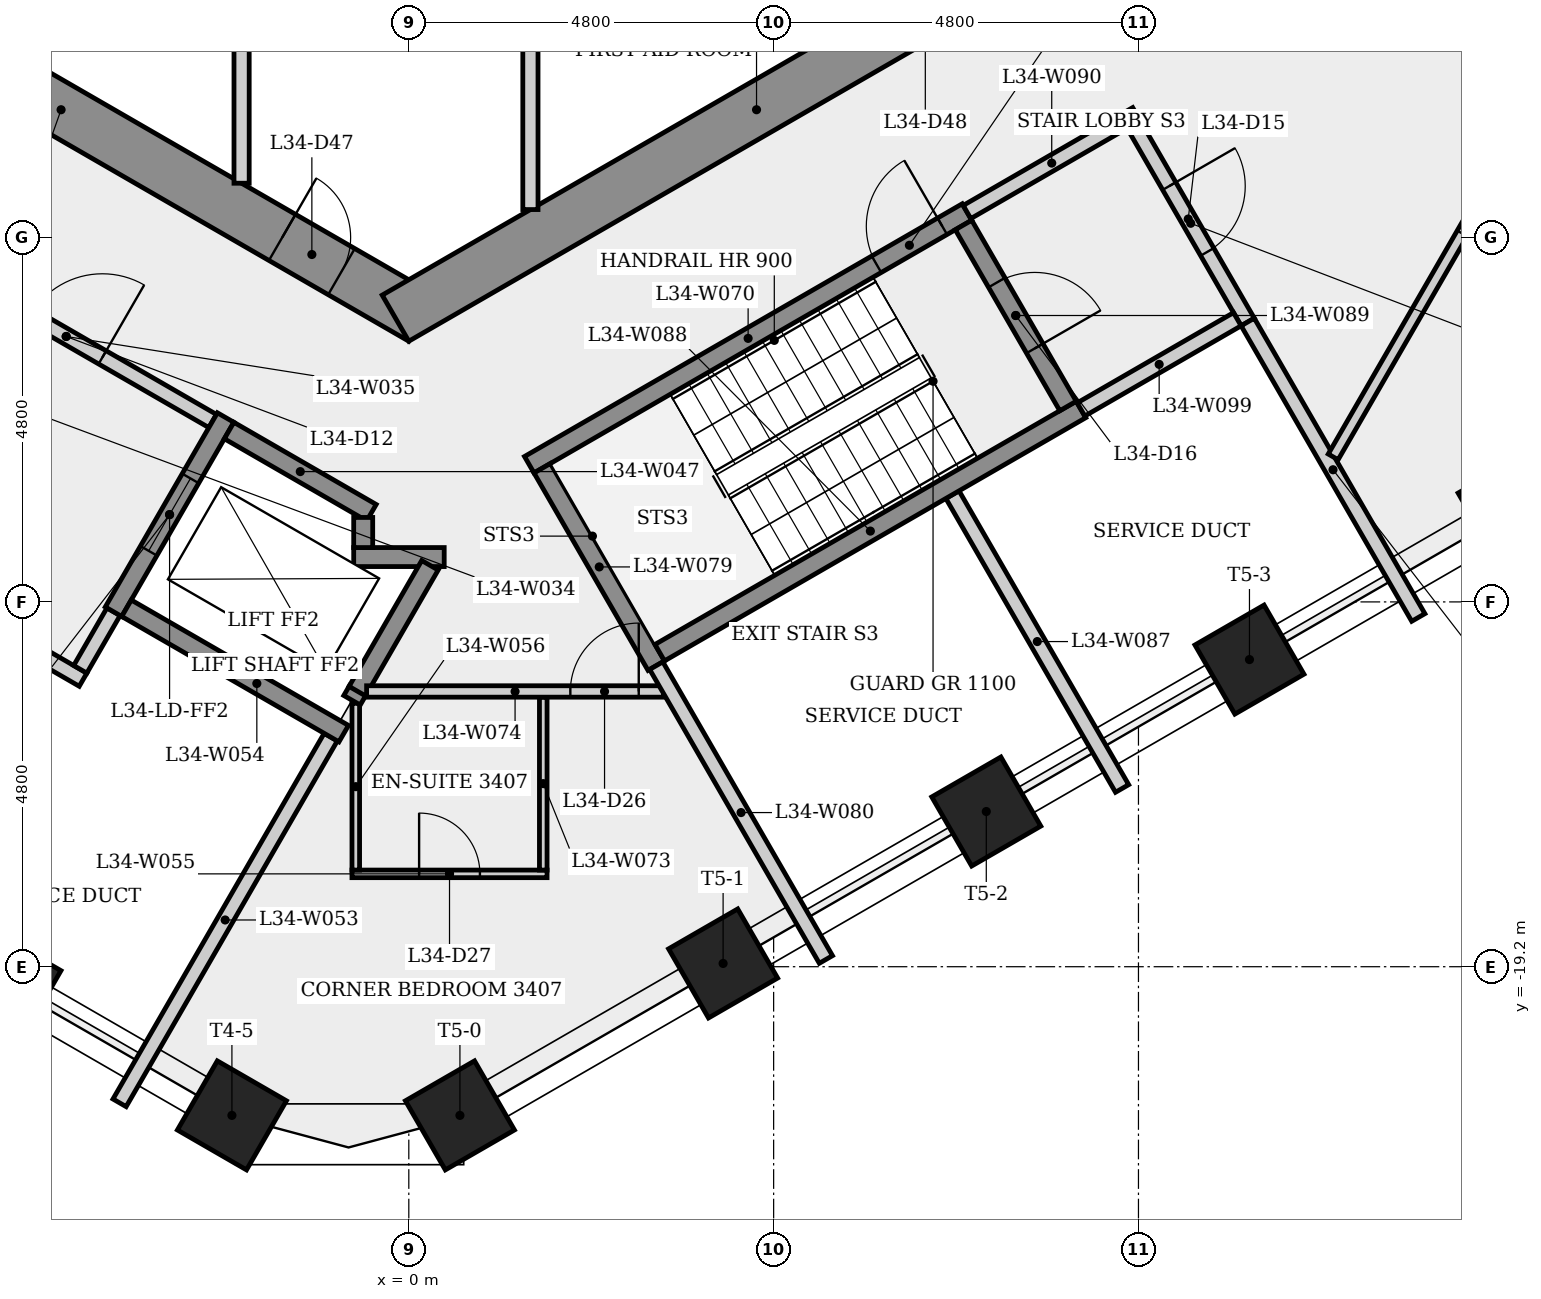
"""IFC4 building model, lengths in metres.
Left out: names, types, materials, properties, quantities, classifications, styles, units other than length and angle.
Written with IfcOpenShell. Run it as: python <this file> out.ifc"""

import sys

from ifc_helpers import new_model, si_unit, direction, frame, frame_2d, origin, origin_2d, place, context, subcontext, project, spatial, rectangle, extrude, element, fill, save


model = new_model("IFC4")
c1 = context("Model", 3, precision=1e-05, world=origin(), true_north=direction((0.0, 1.0)))
c2 = subcontext(c1, "Body", "Model", "MODEL_VIEW")
j1 = project(units=[si_unit("LENGTHUNIT", "METRE"), si_unit("PLANEANGLEUNIT", "RADIAN")], contexts=[c1])
p1 = place(None, origin())
s1 = spatial("IfcSite", under=j1, at=p1, CompositionType="ELEMENT")
p2 = place(p1, origin())
s2 = spatial("IfcBuilding", under=s1, at=p2, CompositionType="ELEMENT")
p3 = place(p2, frame((0.0, 0.0, 128.5)))
s3 = spatial("IfcBuildingStorey", under=s2, at=p3, CompositionType="ELEMENT", Elevation=128.5)
p4 = place(p3, frame((-9.325, -5.182, 0.0), z_axis=(0.0, 0.0, 1.0), x_axis=(0.866023993627, -0.500002442456, 0.0)))
e1 = element("IfcWall", 1, at=p4, inside=s3, PredefinedType="SHEAR", context=c2, shape_type="SweptSolid", body=[
    extrude(rectangle(XDim=10.97, YDim=0.7, at=frame_2d((5.485, 0.0))), origin(), (0.0, 0.0, 1.0), 4.0),
])
p5 = place(p4, frame((2.125, 0.0, 0.0)))
e2 = element("IfcOpeningElement", 2, at=p5, cuts=e1, PredefinedType="OPENING", context=c2, shape_type="SweptSolid", body=[
    extrude(rectangle(XDim=0.9, YDim=2.1, at=frame_2d((0.45, 1.05))), frame((0.0, 0.36, 0.0), z_axis=(0.0, -1.0, 0.0), x_axis=(1.0, 0.0, 0.0)), (0.0, 0.0, 1.0), 0.72),
])
p6 = place(p4, frame((8.845, 0.0, 0.0)))
e3 = element("IfcOpeningElement", 3, at=p6, cuts=e1, PredefinedType="OPENING", context=c2, shape_type="SweptSolid", body=[
    extrude(rectangle(XDim=0.9, YDim=2.1, at=frame_2d((0.45, 1.05))), frame((0.0, 0.36, 0.0), z_axis=(0.0, -1.0, 0.0), x_axis=(1.0, 0.0, 0.0)), (0.0, 0.0, 1.0), 0.72),
])
p7 = place(p3, frame((-0.175, -10.667, 0.0), z_axis=(0.0, 0.0, 1.0), x_axis=(0.866023993627, 0.500002442456, 0.0)))
e4 = element("IfcWall", 4, at=p7, inside=s3, PredefinedType="SHEAR", context=c2, shape_type="SweptSolid", body=[
    extrude(rectangle(XDim=10.97, YDim=0.7, at=frame_2d((5.485, 0.0))), origin(), (0.0, 0.0, 1.0), 4.0),
])
p8 = place(p7, frame((7.599, 0.0, 0.0)))
e5 = element("IfcOpeningElement", 5, at=p8, cuts=e4, PredefinedType="OPENING", context=c2, shape_type="SweptSolid", body=[
    extrude(rectangle(XDim=0.9, YDim=2.1, at=frame_2d((0.45, 1.05))), frame((0.0, 0.36, 0.0), z_axis=(0.0, -1.0, 0.0), x_axis=(1.0, 0.0, 0.0)), (0.0, 0.0, 1.0), 0.72),
])
for number, where, z_axis, x_axis in (
    (6, (-5.293, -19.444, 0.0), (0.0, 0.0, 1.0), (-0.5, -0.866, 0.0)),
    (7, (-2.327, -21.156, 0.0), (0.0, 0.0, 1.0), (-0.5, -0.866, 0.0)),
    (8, (0.673, -21.156, 0.0), (0.0, 0.0, 1.0), (0.5, -0.866, 0.0)),
    (9, (4.135, -19.157, 0.0), (0.0, 0.0, 1.0), (0.5, -0.866, 0.0)),
    (10, (7.598, -17.158, 0.0), (0.0, 0.0, 1.0), (0.5, -0.866, 0.0)),
    (11, (11.06, -15.159, 0.0), (0.0, 0.0, 1.0), (0.5, -0.866, 0.0)),
    (12, (14.523, -13.16, 0.0), (0.0, 0.0, 1.0), (0.5, -0.866, 0.0)),
):
    element("IfcColumn", number, at=place(p3, frame(where, z_axis=z_axis, x_axis=x_axis)), inside=s3, PredefinedType="COLUMN", context=c2, shape_type="SweptSolid", body=[
        extrude(rectangle(XDim=1.05, YDim=1.05, at=origin_2d()), origin(), (0.0, 0.0, 1.0), 4.0),
    ])
p9 = place(p3, frame((-8.356, -13.073, 0.0), z_axis=(0.0, 0.0, 1.0), x_axis=(0.866038532462, -0.499977259774, 0.0)))
e13 = element("IfcWall", 13, at=p9, inside=s3, PredefinedType="PLUMBINGWALL", context=c2, shape_type="SweptSolid", body=[
    extrude(rectangle(XDim=4.7, YDim=0.2, at=frame_2d((2.35, 0.0))), origin(), (0.0, 0.0, 1.0), 3.65),
])
p10 = place(p3, frame((-6.435, -9.795, 0.0), z_axis=(0.0, 0.0, 1.0), x_axis=(0.866012907634, -0.500021643343, 0.0)))
e14 = element("IfcWall", 14, at=p10, inside=s3, PredefinedType="PARTITIONING", context=c2, shape_type="SweptSolid", body=[
    extrude(rectangle(XDim=4.45, YDim=0.2, at=frame_2d((2.225, 0.0))), origin(), (0.0, 0.0, 1.0), 3.65),
])
p11 = place(p10, frame((1.675, 0.0, 0.0)))
e15 = element("IfcOpeningElement", 15, at=p11, cuts=e14, PredefinedType="OPENING", context=c2, shape_type="SweptSolid", body=[
    extrude(rectangle(XDim=1.1, YDim=2.1, at=frame_2d((0.55, 1.05))), frame((0.0, 0.11, 0.0), z_axis=(0.0, -1.0, 0.0), x_axis=(1.0, 0.0, 0.0)), (0.0, 0.0, 1.0), 0.22),
])
p12 = place(p3, frame((-3.885, -14.529, 0.0), z_axis=(0.0, 0.0, 1.0), x_axis=(-0.499859285417, -0.866106630146, 0.0)))
e16 = element("IfcWall", 16, at=p12, inside=s3, PredefinedType="PLUMBINGWALL", context=c2, shape_type="SweptSolid", body=[
    extrude(rectangle(XDim=0.875, YDim=0.2, at=frame_2d((0.438, 0.0))), origin(), (0.0, 0.0, 1.0), 3.65),
])
p13 = place(p3, frame((-2.41, -11.974, 0.0), z_axis=(0.0, 0.0, 1.0), x_axis=(-0.500001826776, -0.866024349092, 0.0)))
e17 = element("IfcWall", 17, at=p13, inside=s3, PredefinedType="SHEAR", context=c2, shape_type="SweptSolid", body=[
    extrude(rectangle(XDim=2.95, YDim=0.25, at=frame_2d((1.475, 0.0))), origin(), (0.0, 0.0, 1.0), 3.65),
])
p14 = place(p13, frame((0.925, 0.0, 0.0)))
e18 = element("IfcOpeningElement", 18, at=p14, cuts=e17, PredefinedType="OPENING", context=c2, shape_type="SweptSolid", body=[
    extrude(rectangle(XDim=1.1, YDim=2.1, at=frame_2d((0.55, 1.05))), frame((0.0, 0.135, 0.0), z_axis=(0.0, -1.0, 0.0), x_axis=(1.0, 0.0, 0.0)), (0.0, 0.0, 1.0), 0.27),
])
p15 = place(p3, frame((-2.364, -12.145, 0.0), z_axis=(0.0, 0.0, 1.0), x_axis=(0.86603892542, -0.499976579108, 0.0)))
e19 = element("IfcWall", 19, at=p15, inside=s3, PredefinedType="SHEAR", context=c2, shape_type="SweptSolid", body=[
    extrude(rectangle(XDim=2.162, YDim=0.25, at=frame_2d((1.081, 0.0))), origin(), (0.0, 0.0, 1.0), 3.65),
])
p16 = place(p3, frame((-2.2, -5.275, 0.0), z_axis=(0.0, 0.0, 1.0), x_axis=(0.0, -1.0, 0.0)))
e20 = element("IfcWall", 20, at=p16, inside=s3, PredefinedType="PARTITIONING", context=c2, shape_type="SweptSolid", body=[
    extrude(rectangle(XDim=3.616, YDim=0.2, at=frame_2d((1.808, 0.0))), origin(), (0.0, 0.0, 1.0), 3.65),
])
p17 = place(p3, frame((-1.027, -16.179, 0.0), z_axis=(0.0, 0.0, 1.0), x_axis=(-0.499995019066, -0.866028279509, 0.0)))
e21 = element("IfcWall", 21, at=p17, inside=s3, PredefinedType="PLUMBINGWALL", context=c2, shape_type="SweptSolid", body=[
    extrude(rectangle(XDim=5.557, YDim=0.2, at=frame_2d((2.778, 0.0))), origin(), (0.0, 0.0, 1.0), 3.65),
])
p18 = place(p3, frame((-0.856, -16.133, 0.0), z_axis=(0.0, 0.0, 1.0), x_axis=(-0.866021716278, 0.500006386895, 0.0)))
e22 = element("IfcWall", 22, at=p18, inside=s3, PredefinedType="SHEAR", context=c2, shape_type="SweptSolid", body=[
    extrude(rectangle(XDim=3.3, YDim=0.25, at=frame_2d((1.65, 0.0))), origin(), (0.0, 0.0, 1.0), 3.65),
])
p19 = place(p3, frame((-0.748, -17.979, 0.0), z_axis=(0.0, 0.0, 1.0), x_axis=(1.0, 0.0, 0.0)))
e23 = element("IfcWall", 23, at=p19, inside=s3, PredefinedType="PARTITIONING", context=c2, shape_type="SweptSolid", body=[
    extrude(rectangle(XDim=2.567, YDim=0.1, at=frame_2d((1.283, 0.0))), origin(), (0.0, 0.0, 1.0), 3.65),
])
p20 = place(p19, frame((0.883, 0.0, 0.0)))
e24 = element("IfcOpeningElement", 24, at=p20, cuts=e23, PredefinedType="OPENING", context=c2, shape_type="SweptSolid", body=[
    extrude(rectangle(XDim=0.8, YDim=2.1, at=frame_2d((0.4, 1.05))), frame((0.0, 0.06, 0.0), z_axis=(0.0, -1.0, 0.0), x_axis=(1.0, 0.0, 0.0)), (0.0, 0.0, 1.0), 0.12),
])
p21 = place(p3, frame((-0.698, -15.733, 0.0), z_axis=(0.0, 0.0, 1.0), x_axis=(0.0, -1.0, 0.0)))
e25 = element("IfcWall", 25, at=p21, inside=s3, PredefinedType="PARTITIONING", context=c2, shape_type="SweptSolid", body=[
    extrude(rectangle(XDim=2.195, YDim=0.1, at=frame_2d((1.098, 0.0))), origin(), (0.0, 0.0, 1.0), 3.65),
])
p22 = place(p3, frame((-0.673, -15.565, 0.0), z_axis=(0.0, 0.0, 1.0), x_axis=(-0.499486146622, -0.866321873978, 0.0)))
e26 = element("IfcWall", 26, at=p22, inside=s3, PredefinedType="SHEAR", context=c2, shape_type="SweptSolid", body=[
    extrude(rectangle(XDim=0.149, YDim=0.25, at=frame_2d((0.075, 0.0))), origin(), (0.0, 0.0, 1.0), 4.0),
])
p23 = place(p3, frame((-0.725, -13.81, 0.0), z_axis=(0.0, 0.0, 1.0), x_axis=(1.0, 0.0, 0.0)))
e27 = element("IfcWall", 27, at=p23, inside=s3, PredefinedType="SHEAR", context=c2, shape_type="SweptSolid", body=[
    extrude(rectangle(XDim=1.191, YDim=0.25, at=frame_2d((0.595, 0.0))), origin(), (0.0, 0.0, 1.0), 3.65),
])
p24 = place(p3, frame((-0.6, -13.289, 0.0), z_axis=(0.0, 0.0, 1.0), x_axis=(0.0, -1.0, 0.0)))
e28 = element("IfcWall", 28, at=p24, inside=s3, PredefinedType="SHEAR", context=c2, shape_type="SweptSolid", body=[
    extrude(rectangle(XDim=0.396, YDim=0.25, at=frame_2d((0.198, 0.0))), origin(), (0.0, 0.0, 1.0), 4.0),
])
p25 = place(p3, frame((0.278, -13.918, 0.0), z_axis=(0.0, 0.0, 1.0), x_axis=(-0.499984020225, -0.866034629516, 0.0)))
e29 = element("IfcWall", 29, at=p25, inside=s3, PredefinedType="SHEAR", context=c2, shape_type="SweptSolid", body=[
    extrude(rectangle(XDim=1.912, YDim=0.25, at=frame_2d((0.956, 0.0))), origin(), (0.0, 0.0, 1.0), 4.0),
])
p26 = place(p3, frame((1.6, -5.275, 0.0), z_axis=(0.0, 0.0, 1.0), x_axis=(0.0, -1.0, 0.0)))
e30 = element("IfcWall", 30, at=p26, inside=s3, PredefinedType="PARTITIONING", context=c2, shape_type="SweptSolid", body=[
    extrude(rectangle(XDim=3.963, YDim=0.2, at=frame_2d((1.981, 0.0))), origin(), (0.0, 0.0, 1.0), 3.65),
])
p27 = place(p3, frame((1.585, -12.595, 0.0), z_axis=(0.0, 0.0, 1.0), x_axis=(0.866036417653, 0.499980922934, 0.0)))
e31 = element("IfcWall", 31, at=p27, inside=s3, PredefinedType="SHEAR", context=c2, shape_type="SweptSolid", body=[
    extrude(rectangle(XDim=6.65, YDim=0.25, at=frame_2d((3.325, 0.0))), origin(), (0.0, 0.0, 1.0), 3.65),
])
p28 = place(p27, frame((5.275, 0.0, 0.0)))
e32 = element("IfcOpeningElement", 32, at=p28, cuts=e31, PredefinedType="OPENING", context=c2, shape_type="SweptSolid", body=[
    extrude(rectangle(XDim=1.0, YDim=2.1, at=frame_2d((0.5, 1.05))), frame((0.0, 0.135, 0.0), z_axis=(0.0, -1.0, 0.0), x_axis=(1.0, 0.0, 0.0)), (0.0, 0.0, 1.0), 0.27),
])
p29 = place(p3, frame((1.769, -17.928, 0.0), z_axis=(0.0, 0.0, 1.0), x_axis=(0.0, 1.0, 0.0)))
e33 = element("IfcWall", 33, at=p29, inside=s3, PredefinedType="PARTITIONING", context=c2, shape_type="SweptSolid", body=[
    extrude(rectangle(XDim=2.275, YDim=0.1, at=frame_2d((1.138, 0.0))), origin(), (0.0, 0.0, 1.0), 3.65),
])
p30 = place(p3, frame((-0.555, -15.578, 0.0), z_axis=(0.0, 0.0, 1.0), x_axis=(1.0, 0.0, 0.0)))
e34 = element("IfcWall", 34, at=p30, inside=s3, PredefinedType="PARTITIONING", context=c2, shape_type="SweptSolid", body=[
    extrude(rectangle(XDim=3.907, YDim=0.15, at=frame_2d((1.954, 0.0))), origin(), (0.0, 0.0, 1.0), 3.65),
])
p31 = place(p30, frame((2.681, 0.0, 0.0)))
e35 = element("IfcOpeningElement", 35, at=p31, cuts=e34, PredefinedType="OPENING", context=c2, shape_type="SweptSolid", body=[
    extrude(rectangle(XDim=0.9, YDim=2.1, at=frame_2d((0.45, 1.05))), frame((0.0, 0.085, 0.0), z_axis=(0.0, -1.0, 0.0), x_axis=(1.0, 0.0, 0.0)), (0.0, 0.0, 1.0), 0.17),
])
p32 = place(p3, frame((3.256, -15.239, 0.0), z_axis=(0.0, 0.0, 1.0), x_axis=(-0.50002537861, 0.866010750942, 0.0)))
e36 = element("IfcWall", 36, at=p32, inside=s3, PredefinedType="SHEAR", context=c2, shape_type="SweptSolid", body=[
    extrude(rectangle(XDim=3.0, YDim=0.25, at=frame_2d((1.5, 0.0))), origin(), (0.0, 0.0, 1.0), 3.65),
])
p33 = place(p3, frame((3.256, -15.239, 0.0), z_axis=(0.0, 0.0, 1.0), x_axis=(0.499962311098, -0.866047162388, 0.0)))
e37 = element("IfcWall", 37, at=p33, inside=s3, PredefinedType="PLUMBINGWALL", context=c2, shape_type="SweptSolid", body=[
    extrude(rectangle(XDim=4.464, YDim=0.2, at=frame_2d((2.232, 0.0))), origin(), (0.0, 0.0, 1.0), 3.65),
])
p34 = place(p3, frame((7.153, -12.989, 0.0), z_axis=(0.0, 0.0, 1.0), x_axis=(0.500003327856, -0.866023482437, 0.0)))
e38 = element("IfcWall", 38, at=p34, inside=s3, PredefinedType="PLUMBINGWALL", context=c2, shape_type="SweptSolid", body=[
    extrude(rectangle(XDim=4.464, YDim=0.2, at=frame_2d((2.232, 0.0))), origin(), (0.0, 0.0, 1.0), 3.65),
])
p35 = place(p3, frame((3.301, -15.068, 0.0), z_axis=(0.0, 0.0, 1.0), x_axis=(0.866035036182, 0.499983315828, 0.0)))
e39 = element("IfcWall", 39, at=p35, inside=s3, PredefinedType="SHEAR", context=c2, shape_type="SweptSolid", body=[
    extrude(rectangle(XDim=6.4, YDim=0.25, at=frame_2d((3.2, 0.0))), origin(), (0.0, 0.0, 1.0), 3.65),
])
p36 = place(p3, frame((7.298, -9.441, 0.0), z_axis=(0.0, 0.0, 1.0), x_axis=(0.500034990121, -0.866005201286, 0.0)))
e40 = element("IfcWall", 40, at=p36, inside=s3, PredefinedType="SHEAR", context=c2, shape_type="SweptSolid", body=[
    extrude(rectangle(XDim=2.75, YDim=0.25, at=frame_2d((1.375, 0.0))), origin(), (0.0, 0.0, 1.0), 3.65),
])
p37 = place(p36, frame((0.875, 0.0, 0.0)))
e41 = element("IfcOpeningElement", 41, at=p37, cuts=e40, PredefinedType="OPENING", context=c2, shape_type="SweptSolid", body=[
    extrude(rectangle(XDim=1.0, YDim=2.1, at=frame_2d((0.5, 1.05))), frame((0.0, 0.135, 0.0), z_axis=(0.0, -1.0, 0.0), x_axis=(1.0, 0.0, 0.0)), (0.0, 0.0, 1.0), 0.27),
])
p38 = place(p3, frame((7.344, -9.27, 0.0), z_axis=(0.0, 0.0, 1.0), x_axis=(0.866005588531, 0.500034319456, 0.0)))
e42 = element("IfcWall", 42, at=p38, inside=s3, PredefinedType="PARTITIONING", context=c2, shape_type="SweptSolid", body=[
    extrude(rectangle(XDim=2.575, YDim=0.2, at=frame_2d((1.288, 0.0))), origin(), (0.0, 0.0, 1.0), 3.65),
])
p39 = place(p3, frame((9.537, -8.119, 0.0), z_axis=(0.0, 0.0, 1.0), x_axis=(0.499990139034, -0.866031096941, 0.0)))
e43 = element("IfcWall", 43, at=p39, inside=s3, PredefinedType="PARTITIONING", context=c2, shape_type="SweptSolid", body=[
    extrude(rectangle(XDim=3.0, YDim=0.2, at=frame_2d((1.5, 0.0))), origin(), (0.0, 0.0, 1.0), 3.65),
])
p40 = place(p39, frame((0.935, 0.0, 0.0)))
e44 = element("IfcOpeningElement", 44, at=p40, cuts=e43, PredefinedType="OPENING", context=c2, shape_type="SweptSolid", body=[
    extrude(rectangle(XDim=1.0, YDim=2.1, at=frame_2d((0.5, 1.05))), frame((0.0, 0.11, 0.0), z_axis=(0.0, -1.0, 0.0), x_axis=(1.0, 0.0, 0.0)), (0.0, 0.0, 1.0), 0.22),
])
p41 = place(p3, frame((10.901, -10.681, 0.0), z_axis=(0.0, 0.0, 1.0), x_axis=(-0.866007538022, -0.500030943131, 0.0)))
e45 = element("IfcWall", 45, at=p41, inside=s3, PredefinedType="PLUMBINGWALL", context=c2, shape_type="SweptSolid", body=[
    extrude(rectangle(XDim=2.375, YDim=0.2, at=frame_2d((1.188, 0.0))), origin(), (0.0, 0.0, 1.0), 3.65),
])
p42 = place(p3, frame((11.037, -10.717, 0.0), z_axis=(0.0, 0.0, 1.0), x_axis=(0.500011188759, -0.866018943855, 0.0)))
e46 = element("IfcWall", 46, at=p42, inside=s3, PredefinedType="PLUMBINGWALL", context=c2, shape_type="SweptSolid", body=[
    extrude(rectangle(XDim=4.489, YDim=0.2, at=frame_2d((2.245, 0.0))), origin(), (0.0, 0.0, 1.0), 3.65),
])
p43 = place(p3, frame((16.356, -5.227, 0.0), z_axis=(0.0, 0.0, 1.0), x_axis=(-0.500017200592, -0.86601547279, 0.0)))
e47 = element("IfcWall", 47, at=p43, inside=s3, PredefinedType="PARTITIONING", context=c2, shape_type="SweptSolid", body=[
    extrude(rectangle(XDim=8.389, YDim=0.15, at=frame_2d((4.194, 0.0))), origin(), (0.0, 0.0, 1.0), 3.65),
])
p44 = place(p43, frame((3.395, 0.0, 0.0)))
e48 = element("IfcOpeningElement", 48, at=p44, cuts=e47, PredefinedType="OPENING", context=c2, shape_type="SweptSolid", body=[
    extrude(rectangle(XDim=1.6, YDim=2.1, at=frame_2d((0.8, 1.05))), frame((0.0, 0.085, 0.0), z_axis=(0.0, -1.0, 0.0), x_axis=(1.0, 0.0, 0.0)), (0.0, 0.0, 1.0), 0.17),
])
p45 = place(p11, origin())
e49 = element("IfcDoor", 49, at=p45, inside=s3, OperationType="SINGLE_SWING_RIGHT", PredefinedType="DOOR", context=c2, shape_type="SweptSolid", body=[
    extrude(rectangle(XDim=1.1, YDim=2.1, at=frame_2d((0.55, 1.05))), frame((0.0, 0.025, 0.0), z_axis=(0.0, -1.0, 0.0), x_axis=(1.0, 0.0, 0.0)), (0.0, 0.0, 1.0), 0.05),
])
fill(e15, e49)
p46 = place(p14, origin())
e50 = element("IfcDoor", 50, at=p46, inside=s3, OperationType="SLIDING_TO_LEFT", PredefinedType="DOOR", context=c2, shape_type="SweptSolid", body=[
    extrude(rectangle(XDim=1.1, YDim=2.1, at=frame_2d((0.55, 1.05))), frame((0.0, 0.025, 0.0), z_axis=(0.0, -1.0, 0.0), x_axis=(1.0, 0.0, 0.0)), (0.0, 0.0, 1.0), 0.05),
])
fill(e18, e50)
p47 = place(p28, origin())
e51 = element("IfcDoor", 51, at=p47, inside=s3, OperationType="SINGLE_SWING_RIGHT", PredefinedType="DOOR", context=c2, shape_type="SweptSolid", body=[
    extrude(rectangle(XDim=1.0, YDim=2.1, at=frame_2d((0.5, 1.05))), frame((0.0, 0.025, 0.0), z_axis=(0.0, -1.0, 0.0), x_axis=(1.0, 0.0, 0.0)), (0.0, 0.0, 1.0), 0.05),
])
fill(e32, e51)
p48 = place(p40, origin())
e52 = element("IfcDoor", 52, at=p48, inside=s3, OperationType="SINGLE_SWING_LEFT", PredefinedType="DOOR", context=c2, shape_type="SweptSolid", body=[
    extrude(rectangle(XDim=1.0, YDim=2.1, at=frame_2d((0.5, 1.05))), frame((0.0, 0.025, 0.0), z_axis=(0.0, -1.0, 0.0), x_axis=(1.0, 0.0, 0.0)), (0.0, 0.0, 1.0), 0.05),
])
fill(e44, e52)
p49 = place(p37, origin())
e53 = element("IfcDoor", 53, at=p49, inside=s3, OperationType="SINGLE_SWING_RIGHT", PredefinedType="DOOR", context=c2, shape_type="SweptSolid", body=[
    extrude(rectangle(XDim=1.0, YDim=2.1, at=frame_2d((0.5, 1.05))), frame((0.0, 0.025, 0.0), z_axis=(0.0, -1.0, 0.0), x_axis=(1.0, 0.0, 0.0)), (0.0, 0.0, 1.0), 0.05),
])
fill(e41, e53)
p50 = place(p31, origin())
e54 = element("IfcDoor", 54, at=p50, inside=s3, OperationType="SINGLE_SWING_RIGHT", PredefinedType="DOOR", context=c2, shape_type="SweptSolid", body=[
    extrude(rectangle(XDim=0.9, YDim=2.1, at=frame_2d((0.45, 1.05))), frame((0.0, 0.025, 0.0), z_axis=(0.0, -1.0, 0.0), x_axis=(1.0, 0.0, 0.0)), (0.0, 0.0, 1.0), 0.05),
])
fill(e35, e54)
p51 = place(p20, origin())
e55 = element("IfcDoor", 55, at=p51, inside=s3, OperationType="SINGLE_SWING_LEFT", PredefinedType="DOOR", context=c2, shape_type="SweptSolid", body=[
    extrude(rectangle(XDim=0.8, YDim=2.1, at=frame_2d((0.4, 1.05))), frame((0.0, 0.025, 0.0), z_axis=(0.0, -1.0, 0.0), x_axis=(1.0, 0.0, 0.0)), (0.0, 0.0, 1.0), 0.05),
])
fill(e24, e55)
p52 = place(p44, origin())
e56 = element("IfcDoor", 56, at=p52, inside=s3, OperationType="SINGLE_SWING_LEFT", PredefinedType="DOOR", context=c2, shape_type="SweptSolid", body=[
    extrude(rectangle(XDim=1.6, YDim=2.1, at=frame_2d((0.8, 1.05))), frame((0.0, 0.025, 0.0), z_axis=(0.0, -1.0, 0.0), x_axis=(1.0, 0.0, 0.0)), (0.0, 0.0, 1.0), 0.05),
])
fill(e48, e56)
p53 = place(p6, origin())
e57 = element("IfcDoor", 57, at=p53, inside=s3, OperationType="SINGLE_SWING_LEFT", PredefinedType="DOOR", context=c2, shape_type="SweptSolid", body=[
    extrude(rectangle(XDim=0.9, YDim=2.1, at=frame_2d((0.45, 1.05))), frame((0.0, 0.025, 0.0), z_axis=(0.0, -1.0, 0.0), x_axis=(1.0, 0.0, 0.0)), (0.0, 0.0, 1.0), 0.05),
])
fill(e3, e57)
save(model, sys.argv[1])
